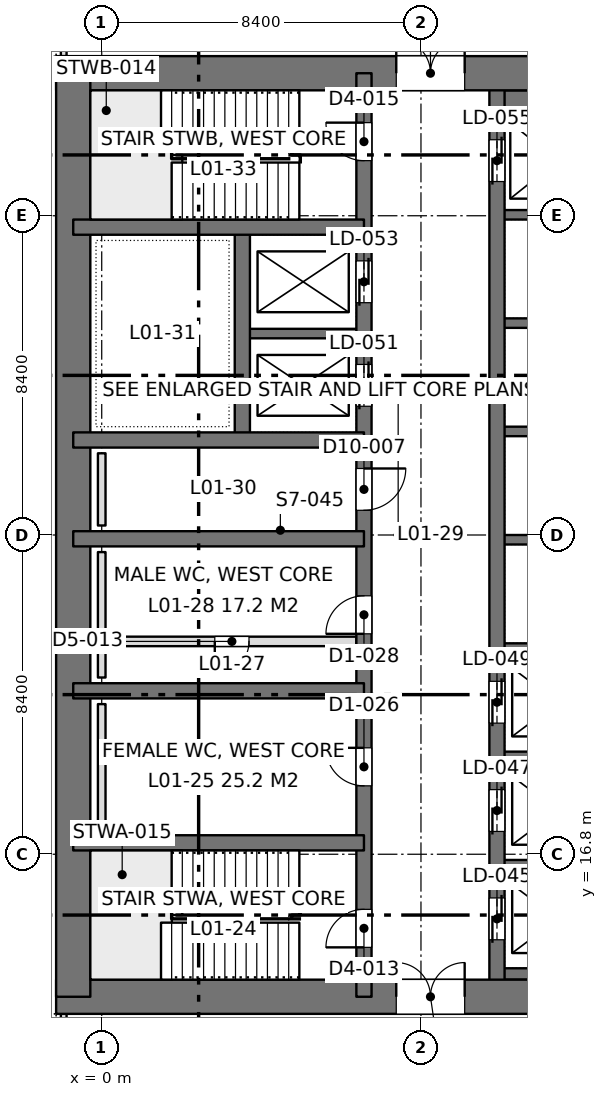
"""IFC4 building model, lengths in metres.
Left out: names, types, materials, properties, quantities, classifications, styles, units other than length and angle.
Written with IfcOpenShell. Run it as: python <this file> out.ifc"""

import sys

from ifc_helpers import new_model, si_unit, direction, frame, frame_2d, origin, place, context, subcontext, project, spatial, rectangle, extrude, element, fill, save


model = new_model("IFC4")
c1 = context("Model", 3, precision=1e-05, world=origin(), true_north=direction((0.0, 1.0)))
c2 = subcontext(c1, "Body", "Model", "MODEL_VIEW")
j1 = project(units=[si_unit("LENGTHUNIT", "METRE"), si_unit("PLANEANGLEUNIT", "RADIAN")], contexts=[c1])
p1 = place(None, origin())
s1 = spatial("IfcSite", under=j1, at=p1, CompositionType="ELEMENT")
p2 = place(p1, origin())
s2 = spatial("IfcBuilding", under=s1, at=p2, CompositionType="ELEMENT")
p3 = place(p2, frame((0.0, 0.0, 5.4)))
s3 = spatial("IfcBuildingStorey", under=s2, at=p3, CompositionType="ELEMENT", Elevation=5.4)
p4 = place(p3, frame((-1.2, 13.05, 0.0), z_axis=(0.0, 0.0, 1.0), x_axis=(1.0, 0.0, 0.0)))
e1 = element("IfcWall", 1, at=p4, inside=s3, PredefinedType="SHEAR", context=c2, shape_type="SweptSolid", body=[
    extrude(rectangle(XDim=18.0, YDim=0.9, at=frame_2d((9.0, 0.0))), origin(), (0.0, 0.0, 1.0), 4.5),
])
p5 = place(p4, frame((8.95, 0.0, 0.0)))
e2 = element("IfcOpeningElement", 2, at=p5, cuts=e1, PredefinedType="OPENING", context=c2, shape_type="SweptSolid", body=[
    extrude(rectangle(XDim=1.8, YDim=2.4, at=frame_2d((0.9, 1.2))), frame((0.0, 0.46, 0.0), z_axis=(0.0, -1.0, 0.0), x_axis=(1.0, 0.0, 0.0)), (0.0, 0.0, 1.0), 0.92),
])
p6 = place(p3, frame((-1.2, 37.35, 0.0), z_axis=(0.0, 0.0, 1.0), x_axis=(1.0, 0.0, 0.0)))
e3 = element("IfcWall", 3, at=p6, inside=s3, PredefinedType="SHEAR", context=c2, shape_type="SweptSolid", body=[
    extrude(rectangle(XDim=18.0, YDim=0.9, at=frame_2d((9.0, 0.0))), origin(), (0.0, 0.0, 1.0), 4.5),
])
p7 = place(p6, frame((8.95, 0.0, 0.0)))
e4 = element("IfcOpeningElement", 4, at=p7, cuts=e3, PredefinedType="OPENING", context=c2, shape_type="SweptSolid", body=[
    extrude(rectangle(XDim=1.8, YDim=2.4, at=frame_2d((0.9, 1.2))), frame((0.0, 0.46, 0.0), z_axis=(0.0, -1.0, 0.0), x_axis=(1.0, 0.0, 0.0)), (0.0, 0.0, 1.0), 0.92),
])
p8 = place(p3, frame((-0.75, 13.05, 0.0), z_axis=(0.0, 0.0, 1.0), x_axis=(0.0, 1.0, 0.0)))
e5 = element("IfcWall", 5, at=p8, inside=s3, PredefinedType="SHEAR", context=c2, shape_type="SweptSolid", body=[
    extrude(rectangle(XDim=24.3, YDim=0.9, at=frame_2d((12.15, 0.0))), origin(), (0.0, 0.0, 1.0), 4.5),
])
p9 = place(p3, frame((6.9, 13.05, 0.0), z_axis=(0.0, 0.0, 1.0), x_axis=(0.0, 1.0, 0.0)))
e6 = element("IfcWall", 6, at=p9, inside=s3, PredefinedType="SHEAR", context=c2, shape_type="SweptSolid", body=[
    extrude(rectangle(XDim=24.3, YDim=0.4, at=frame_2d((12.15, 0.0))), origin(), (0.0, 0.0, 1.0), 4.5),
])
p10 = place(p9, frame((1.3, 0.0, 0.0)))
e7 = element("IfcOpeningElement", 7, at=p10, cuts=e6, PredefinedType="OPENING", context=c2, shape_type="SweptSolid", body=[
    extrude(rectangle(XDim=1.0, YDim=2.2, at=frame_2d((0.5, 1.1))), frame((0.0, 0.21, 0.0), z_axis=(0.0, -1.0, 0.0), x_axis=(1.0, 0.0, 0.0)), (0.0, 0.0, 1.0), 0.42),
])
p11 = place(p9, frame((22.0, 0.0, 0.0)))
e8 = element("IfcOpeningElement", 8, at=p11, cuts=e6, PredefinedType="OPENING", context=c2, shape_type="SweptSolid", body=[
    extrude(rectangle(XDim=1.0, YDim=2.2, at=frame_2d((0.5, 1.1))), frame((0.0, 0.21, 0.0), z_axis=(0.0, -1.0, 0.0), x_axis=(1.0, 0.0, 0.0)), (0.0, 0.0, 1.0), 0.42),
])
p12 = place(p9, frame((5.55, 0.0, 0.0)))
e9 = element("IfcOpeningElement", 9, at=p12, cuts=e6, PredefinedType="OPENING", context=c2, shape_type="SweptSolid", body=[
    extrude(rectangle(XDim=1.0, YDim=2.2, at=frame_2d((0.5, 1.1))), frame((0.0, 0.21, 0.0), z_axis=(0.0, -1.0, 0.0), x_axis=(1.0, 0.0, 0.0)), (0.0, 0.0, 1.0), 0.42),
])
p13 = place(p9, frame((9.55, 0.0, 0.0)))
e10 = element("IfcOpeningElement", 10, at=p13, cuts=e6, PredefinedType="OPENING", context=c2, shape_type="SweptSolid", body=[
    extrude(rectangle(XDim=1.0, YDim=2.2, at=frame_2d((0.5, 1.1))), frame((0.0, 0.21, 0.0), z_axis=(0.0, -1.0, 0.0), x_axis=(1.0, 0.0, 0.0)), (0.0, 0.0, 1.0), 0.42),
])
p14 = place(p9, frame((12.8, 0.0, 0.0)))
e11 = element("IfcOpeningElement", 11, at=p14, cuts=e6, PredefinedType="OPENING", context=c2, shape_type="SweptSolid", body=[
    extrude(rectangle(XDim=1.1, YDim=2.2, at=frame_2d((0.55, 1.1))), frame((0.0, 0.21, 0.0), z_axis=(0.0, -1.0, 0.0), x_axis=(1.0, 0.0, 0.0)), (0.0, 0.0, 1.0), 0.42),
])
p15 = place(p9, frame((15.538, 0.0, 0.0)))
e12 = element("IfcOpeningElement", 12, at=p15, cuts=e6, PredefinedType="OPENING", context=c2, shape_type="SweptSolid", body=[
    extrude(rectangle(XDim=1.1, YDim=2.2, at=frame_2d((0.55, 1.1))), frame((0.0, 0.21, 0.0), z_axis=(0.0, -1.0, 0.0), x_axis=(1.0, 0.0, 0.0)), (0.0, 0.0, 1.0), 0.42),
])
p16 = place(p9, frame((18.262, 0.0, 0.0)))
e13 = element("IfcOpeningElement", 13, at=p16, cuts=e6, PredefinedType="OPENING", context=c2, shape_type="SweptSolid", body=[
    extrude(rectangle(XDim=1.1, YDim=2.2, at=frame_2d((0.55, 1.1))), frame((0.0, 0.21, 0.0), z_axis=(0.0, -1.0, 0.0), x_axis=(1.0, 0.0, 0.0)), (0.0, 0.0, 1.0), 0.42),
])
p17 = place(p3, frame((10.4, 13.05, 0.0), z_axis=(0.0, 0.0, 1.0), x_axis=(0.0, 1.0, 0.0)))
e14 = element("IfcWall", 14, at=p17, inside=s3, PredefinedType="SHEAR", context=c2, shape_type="SweptSolid", body=[
    extrude(rectangle(XDim=24.3, YDim=0.4, at=frame_2d((12.15, 0.0))), origin(), (0.0, 0.0, 1.0), 4.5),
])
p18 = place(p17, frame((1.5, 0.0, 0.0)))
e15 = element("IfcOpeningElement", 15, at=p18, cuts=e14, PredefinedType="OPENING", context=c2, shape_type="SweptSolid", body=[
    extrude(rectangle(XDim=1.1, YDim=2.2, at=frame_2d((0.55, 1.1))), frame((0.0, 0.21, 0.0), z_axis=(0.0, -1.0, 0.0), x_axis=(1.0, 0.0, 0.0)), (0.0, 0.0, 1.0), 0.42),
])
p19 = place(p17, frame((4.35, 0.0, 0.0)))
e16 = element("IfcOpeningElement", 16, at=p19, cuts=e14, PredefinedType="OPENING", context=c2, shape_type="SweptSolid", body=[
    extrude(rectangle(XDim=1.1, YDim=2.2, at=frame_2d((0.55, 1.1))), frame((0.0, 0.21, 0.0), z_axis=(0.0, -1.0, 0.0), x_axis=(1.0, 0.0, 0.0)), (0.0, 0.0, 1.0), 0.42),
])
p20 = place(p17, frame((7.2, 0.0, 0.0)))
e17 = element("IfcOpeningElement", 17, at=p20, cuts=e14, PredefinedType="OPENING", context=c2, shape_type="SweptSolid", body=[
    extrude(rectangle(XDim=1.1, YDim=2.2, at=frame_2d((0.55, 1.1))), frame((0.0, 0.21, 0.0), z_axis=(0.0, -1.0, 0.0), x_axis=(1.0, 0.0, 0.0)), (0.0, 0.0, 1.0), 0.42),
])
p21 = place(p17, frame((21.45, 0.0, 0.0)))
e18 = element("IfcOpeningElement", 18, at=p21, cuts=e14, PredefinedType="OPENING", context=c2, shape_type="SweptSolid", body=[
    extrude(rectangle(XDim=1.1, YDim=2.2, at=frame_2d((0.55, 1.1))), frame((0.0, 0.21, 0.0), z_axis=(0.0, -1.0, 0.0), x_axis=(1.0, 0.0, 0.0)), (0.0, 0.0, 1.0), 0.42),
])
for number, where, z_axis, x_axis in (
    (19, (-0.75, 17.1, 0.0), (0.0, 0.0, 1.0), (1.0, 0.0, 0.0)),
    (20, (-0.75, 21.1, 0.0), (0.0, 0.0, 1.0), (1.0, 0.0, 0.0)),
    (21, (-0.75, 25.1, 0.0), (0.0, 0.0, 1.0), (1.0, 0.0, 0.0)),
    (22, (-0.75, 27.7, 0.0), (0.0, 0.0, 1.0), (1.0, 0.0, 0.0)),
    (23, (-0.75, 33.3, 0.0), (0.0, 0.0, 1.0), (1.0, 0.0, 0.0)),
):
    element("IfcWall", number, at=place(p3, frame(where, z_axis=z_axis, x_axis=x_axis)), inside=s3, PredefinedType="SHEAR", context=c2, shape_type="SweptSolid", body=[
        extrude(rectangle(XDim=7.65, YDim=0.4, at=frame_2d((3.825, 0.0))), origin(), (0.0, 0.0, 1.0), 4.5),
    ])
p22 = place(p3, frame((3.7, 27.7, 0.0), z_axis=(0.0, 0.0, 1.0), x_axis=(0.0, 1.0, 0.0)))
e24 = element("IfcWall", 24, at=p22, inside=s3, PredefinedType="SHEAR", context=c2, shape_type="SweptSolid", body=[
    extrude(rectangle(XDim=5.6, YDim=0.4, at=frame_2d((2.8, 0.0))), origin(), (0.0, 0.0, 1.0), 4.5),
])
p23 = place(p3, frame((3.7, 30.5, 0.0), z_axis=(0.0, 0.0, 1.0), x_axis=(1.0, 0.0, 0.0)))
e25 = element("IfcWall", 25, at=p23, inside=s3, PredefinedType="SHEAR", context=c2, shape_type="SweptSolid", body=[
    extrude(rectangle(XDim=3.2, YDim=0.25, at=frame_2d((1.6, 0.0))), origin(), (0.0, 0.0, 1.0), 4.5),
])
p24 = place(p3, frame((10.4, 13.65, 0.0), z_axis=(0.0, 0.0, 1.0), x_axis=(1.0, 0.0, 0.0)))
e26 = element("IfcWall", 26, at=p24, inside=s3, PredefinedType="SHEAR", context=c2, shape_type="SweptSolid", body=[
    extrude(rectangle(XDim=3.2, YDim=0.3, at=frame_2d((1.6, 0.0))), origin(), (0.0, 0.0, 1.0), 4.5),
])
for number, where, z_axis, x_axis in (
    (27, (10.4, 16.525, 0.0), (0.0, 0.0, 1.0), (1.0, 0.0, 0.0)),
    (28, (10.4, 19.375, 0.0), (0.0, 0.0, 1.0), (1.0, 0.0, 0.0)),
    (29, (10.4, 22.225, 0.0), (0.0, 0.0, 1.0), (1.0, 0.0, 0.0)),
    (30, (10.4, 25.075, 0.0), (0.0, 0.0, 1.0), (1.0, 0.0, 0.0)),
    (31, (10.4, 27.925, 0.0), (0.0, 0.0, 1.0), (1.0, 0.0, 0.0)),
    (32, (10.4, 30.775, 0.0), (0.0, 0.0, 1.0), (1.0, 0.0, 0.0)),
    (33, (10.4, 33.625, 0.0), (0.0, 0.0, 1.0), (1.0, 0.0, 0.0)),
):
    element("IfcWall", number, at=place(p3, frame(where, z_axis=z_axis, x_axis=x_axis)), inside=s3, PredefinedType="SHEAR", context=c2, shape_type="SweptSolid", body=[
        extrude(rectangle(XDim=3.2, YDim=0.25, at=frame_2d((1.6, 0.0))), origin(), (0.0, 0.0, 1.0), 4.5),
    ])
p25 = place(p3, frame((10.4, 36.625, 0.0), z_axis=(0.0, 0.0, 1.0), x_axis=(1.0, 0.0, 0.0)))
e34 = element("IfcWall", 34, at=p25, inside=s3, PredefinedType="SHEAR", context=c2, shape_type="SweptSolid", body=[
    extrude(rectangle(XDim=3.2, YDim=0.55, at=frame_2d((1.6, 0.0))), origin(), (0.0, 0.0, 1.0), 4.5),
])
p26 = place(p3, frame((-1.0, -1.0, 0.0), z_axis=(0.0, 0.0, 1.0), x_axis=(0.0, 1.0, 0.0)))
e35 = element("IfcWall", 35, at=p26, inside=s3, PredefinedType="PARTITIONING", context=c2, shape_type="SweptSolid", body=[
    extrude(rectangle(XDim=13.602, YDim=0.15, at=frame_2d((6.801, 0.0))), origin(), (0.0, 0.0, 1.0), 3.7),
])
p27 = place(p26, frame((4.7, 0.0, 0.0)))
e36 = element("IfcOpeningElement", 36, at=p27, cuts=e35, PredefinedType="OPENING", context=c2, shape_type="SweptSolid", body=[
    extrude(rectangle(XDim=1.0, YDim=2.2, at=frame_2d((0.5, 1.1))), frame((0.0, 0.085, 0.0), z_axis=(0.0, -1.0, 0.0), x_axis=(1.0, 0.0, 0.0)), (0.0, 0.0, 1.0), 0.17),
])
p28 = place(p3, frame((-1.0, 37.8, 0.0), z_axis=(0.0, 0.0, 1.0), x_axis=(0.0, 1.0, 0.0)))
e37 = element("IfcWall", 37, at=p28, inside=s3, PredefinedType="PARTITIONING", context=c2, shape_type="SweptSolid", body=[
    extrude(rectangle(XDim=6.48, YDim=0.15, at=frame_2d((3.24, 0.0))), origin(), (0.0, 0.0, 1.0), 3.7),
])
p29 = place(p28, frame((1.6, 0.0, 0.0)))
e38 = element("IfcOpeningElement", 38, at=p29, cuts=e37, PredefinedType="OPENING", context=c2, shape_type="SweptSolid", body=[
    extrude(rectangle(XDim=1.0, YDim=2.2, at=frame_2d((0.5, 1.1))), frame((0.0, 0.085, 0.0), z_axis=(0.0, -1.0, 0.0), x_axis=(1.0, 0.0, 0.0)), (0.0, 0.0, 1.0), 0.17),
])
p30 = place(p3, frame((0.1, 22.4, 0.0), z_axis=(0.0, 0.0, 1.0), x_axis=(1.0, 0.0, 0.0)))
e39 = element("IfcWall", 39, at=p30, inside=s3, PredefinedType="PARTITIONING", context=c2, shape_type="SweptSolid", body=[
    extrude(rectangle(XDim=6.6, YDim=0.25, at=frame_2d((3.3, 0.0))), origin(), (0.0, 0.0, 1.0), 4.3),
])
p31 = place(p30, frame((2.875, 0.0, 0.0)))
e40 = element("IfcOpeningElement", 40, at=p31, cuts=e39, PredefinedType="OPENING", context=c2, shape_type="SweptSolid", body=[
    extrude(rectangle(XDim=0.9, YDim=2.2, at=frame_2d((0.45, 1.1))), frame((0.0, 0.135, 0.0), z_axis=(0.0, -1.0, 0.0), x_axis=(1.0, 0.0, 0.0)), (0.0, 0.0, 1.0), 0.27),
])
for number, where, z_axis, x_axis in (
    (41, (0.0, 17.45, 0.0), (0.0, 0.0, 1.0), (0.0, 1.0, 0.0)),
    (42, (0.0, 21.45, 0.0), (0.0, 0.0, 1.0), (0.0, 1.0, 0.0)),
):
    element("IfcWall", number, at=place(p3, frame(where, z_axis=z_axis, x_axis=x_axis)), inside=s3, PredefinedType="PLUMBINGWALL", context=c2, shape_type="SweptSolid", body=[
        extrude(rectangle(XDim=3.3, YDim=0.2, at=frame_2d((1.65, 0.0))), origin(), (0.0, 0.0, 1.0), 1.2),
    ])
p32 = place(p3, frame((0.0, 25.45, 0.0), z_axis=(0.0, 0.0, 1.0), x_axis=(0.0, 1.0, 0.0)))
e43 = element("IfcWall", 43, at=p32, inside=s3, PredefinedType="PLUMBINGWALL", context=c2, shape_type="SweptSolid", body=[
    extrude(rectangle(XDim=1.9, YDim=0.2, at=frame_2d((0.95, 0.0))), origin(), (0.0, 0.0, 1.0), 1.2),
])
p33 = place(p5, origin())
e44 = element("IfcDoor", 44, at=p33, inside=s3, OperationType="DOUBLE_DOOR_SINGLE_SWING", PredefinedType="DOOR", context=c2, shape_type="SweptSolid", body=[
    extrude(rectangle(XDim=1.8, YDim=2.4, at=frame_2d((0.9, 1.2))), frame((0.0, 0.025, 0.0), z_axis=(0.0, -1.0, 0.0), x_axis=(1.0, 0.0, 0.0)), (0.0, 0.0, 1.0), 0.05),
])
fill(e2, e44)
p34 = place(p7, origin())
e45 = element("IfcDoor", 45, at=p34, inside=s3, OperationType="DOUBLE_DOOR_SINGLE_SWING", PredefinedType="DOOR", context=c2, shape_type="SweptSolid", body=[
    extrude(rectangle(XDim=1.8, YDim=2.4, at=frame_2d((0.9, 1.2))), frame((0.0, 0.025, 0.0), z_axis=(0.0, -1.0, 0.0), x_axis=(1.0, 0.0, 0.0)), (0.0, 0.0, 1.0), 0.05),
])
fill(e4, e45)
p35 = place(p10, origin())
e46 = element("IfcDoor", 46, at=p35, inside=s3, OperationType="SINGLE_SWING_LEFT", PredefinedType="DOOR", context=c2, shape_type="SweptSolid", body=[
    extrude(rectangle(XDim=1.0, YDim=2.2, at=frame_2d((0.5, 1.1))), frame((0.0, 0.025, 0.0), z_axis=(0.0, -1.0, 0.0), x_axis=(1.0, 0.0, 0.0)), (0.0, 0.0, 1.0), 0.05),
])
fill(e7, e46)
p36 = place(p11, origin())
e47 = element("IfcDoor", 47, at=p36, inside=s3, OperationType="SINGLE_SWING_RIGHT", PredefinedType="DOOR", context=c2, shape_type="SweptSolid", body=[
    extrude(rectangle(XDim=1.0, YDim=2.2, at=frame_2d((0.5, 1.1))), frame((0.0, 0.025, 0.0), z_axis=(0.0, -1.0, 0.0), x_axis=(1.0, 0.0, 0.0)), (0.0, 0.0, 1.0), 0.05),
])
fill(e8, e47)
p37 = place(p12, origin())
e48 = element("IfcDoor", 48, at=p37, inside=s3, OperationType="SINGLE_SWING_RIGHT", PredefinedType="DOOR", context=c2, shape_type="SweptSolid", body=[
    extrude(rectangle(XDim=1.0, YDim=2.2, at=frame_2d((0.5, 1.1))), frame((0.0, 0.025, 0.0), z_axis=(0.0, -1.0, 0.0), x_axis=(1.0, 0.0, 0.0)), (0.0, 0.0, 1.0), 0.05),
])
fill(e9, e48)
p38 = place(p13, origin())
e49 = element("IfcDoor", 49, at=p38, inside=s3, OperationType="SINGLE_SWING_LEFT", PredefinedType="DOOR", context=c2, shape_type="SweptSolid", body=[
    extrude(rectangle(XDim=1.0, YDim=2.2, at=frame_2d((0.5, 1.1))), frame((0.0, 0.025, 0.0), z_axis=(0.0, -1.0, 0.0), x_axis=(1.0, 0.0, 0.0)), (0.0, 0.0, 1.0), 0.05),
])
fill(e10, e49)
p39 = place(p14, frame((1.1, 0.0, 0.0), z_axis=(0.0, 0.0, 1.0), x_axis=(-1.0, 0.0, 0.0)))
e50 = element("IfcDoor", 50, at=p39, inside=s3, OperationType="SINGLE_SWING_LEFT", PredefinedType="DOOR", context=c2, shape_type="SweptSolid", body=[
    extrude(rectangle(XDim=1.1, YDim=2.2, at=frame_2d((0.55, 1.1))), frame((0.0, 0.025, 0.0), z_axis=(0.0, -1.0, 0.0), x_axis=(1.0, 0.0, 0.0)), (0.0, 0.0, 1.0), 0.05),
])
fill(e11, e50)
p40 = place(p18, origin())
e51 = element("IfcDoor", 51, at=p40, inside=s3, OperationType="DOUBLE_DOOR_SLIDING", PredefinedType="DOOR", context=c2, shape_type="SweptSolid", body=[
    extrude(rectangle(XDim=1.1, YDim=2.2, at=frame_2d((0.55, 1.1))), frame((0.0, 0.025, 0.0), z_axis=(0.0, -1.0, 0.0), x_axis=(1.0, 0.0, 0.0)), (0.0, 0.0, 1.0), 0.05),
])
fill(e15, e51)
p41 = place(p19, origin())
e52 = element("IfcDoor", 52, at=p41, inside=s3, OperationType="DOUBLE_DOOR_SLIDING", PredefinedType="DOOR", context=c2, shape_type="SweptSolid", body=[
    extrude(rectangle(XDim=1.1, YDim=2.2, at=frame_2d((0.55, 1.1))), frame((0.0, 0.025, 0.0), z_axis=(0.0, -1.0, 0.0), x_axis=(1.0, 0.0, 0.0)), (0.0, 0.0, 1.0), 0.05),
])
fill(e16, e52)
p42 = place(p20, origin())
e53 = element("IfcDoor", 53, at=p42, inside=s3, OperationType="DOUBLE_DOOR_SLIDING", PredefinedType="DOOR", context=c2, shape_type="SweptSolid", body=[
    extrude(rectangle(XDim=1.1, YDim=2.2, at=frame_2d((0.55, 1.1))), frame((0.0, 0.025, 0.0), z_axis=(0.0, -1.0, 0.0), x_axis=(1.0, 0.0, 0.0)), (0.0, 0.0, 1.0), 0.05),
])
fill(e17, e53)
p43 = place(p21, origin())
e54 = element("IfcDoor", 54, at=p43, inside=s3, OperationType="DOUBLE_DOOR_SLIDING", PredefinedType="DOOR", context=c2, shape_type="SweptSolid", body=[
    extrude(rectangle(XDim=1.1, YDim=2.2, at=frame_2d((0.55, 1.1))), frame((0.0, 0.025, 0.0), z_axis=(0.0, -1.0, 0.0), x_axis=(1.0, 0.0, 0.0)), (0.0, 0.0, 1.0), 0.05),
])
fill(e18, e54)
p44 = place(p15, origin())
e55 = element("IfcDoor", 55, at=p44, inside=s3, OperationType="DOUBLE_DOOR_SLIDING", PredefinedType="DOOR", context=c2, shape_type="SweptSolid", body=[
    extrude(rectangle(XDim=1.1, YDim=2.2, at=frame_2d((0.55, 1.1))), frame((0.0, 0.025, 0.0), z_axis=(0.0, -1.0, 0.0), x_axis=(1.0, 0.0, 0.0)), (0.0, 0.0, 1.0), 0.05),
])
fill(e12, e55)
p45 = place(p16, origin())
e56 = element("IfcDoor", 56, at=p45, inside=s3, OperationType="DOUBLE_DOOR_SLIDING", PredefinedType="DOOR", context=c2, shape_type="SweptSolid", body=[
    extrude(rectangle(XDim=1.1, YDim=2.2, at=frame_2d((0.55, 1.1))), frame((0.0, 0.025, 0.0), z_axis=(0.0, -1.0, 0.0), x_axis=(1.0, 0.0, 0.0)), (0.0, 0.0, 1.0), 0.05),
])
fill(e13, e56)
p46 = place(p31, frame((0.9, 0.0, 0.0), z_axis=(0.0, 0.0, 1.0), x_axis=(-1.0, 0.0, 0.0)))
e57 = element("IfcDoor", 57, at=p46, inside=s3, OperationType="SINGLE_SWING_RIGHT", PredefinedType="DOOR", context=c2, shape_type="SweptSolid", body=[
    extrude(rectangle(XDim=0.9, YDim=2.2, at=frame_2d((0.45, 1.1))), frame((0.0, 0.025, 0.0), z_axis=(0.0, -1.0, 0.0), x_axis=(1.0, 0.0, 0.0)), (0.0, 0.0, 1.0), 0.05),
])
fill(e40, e57)
save(model, sys.argv[1])
